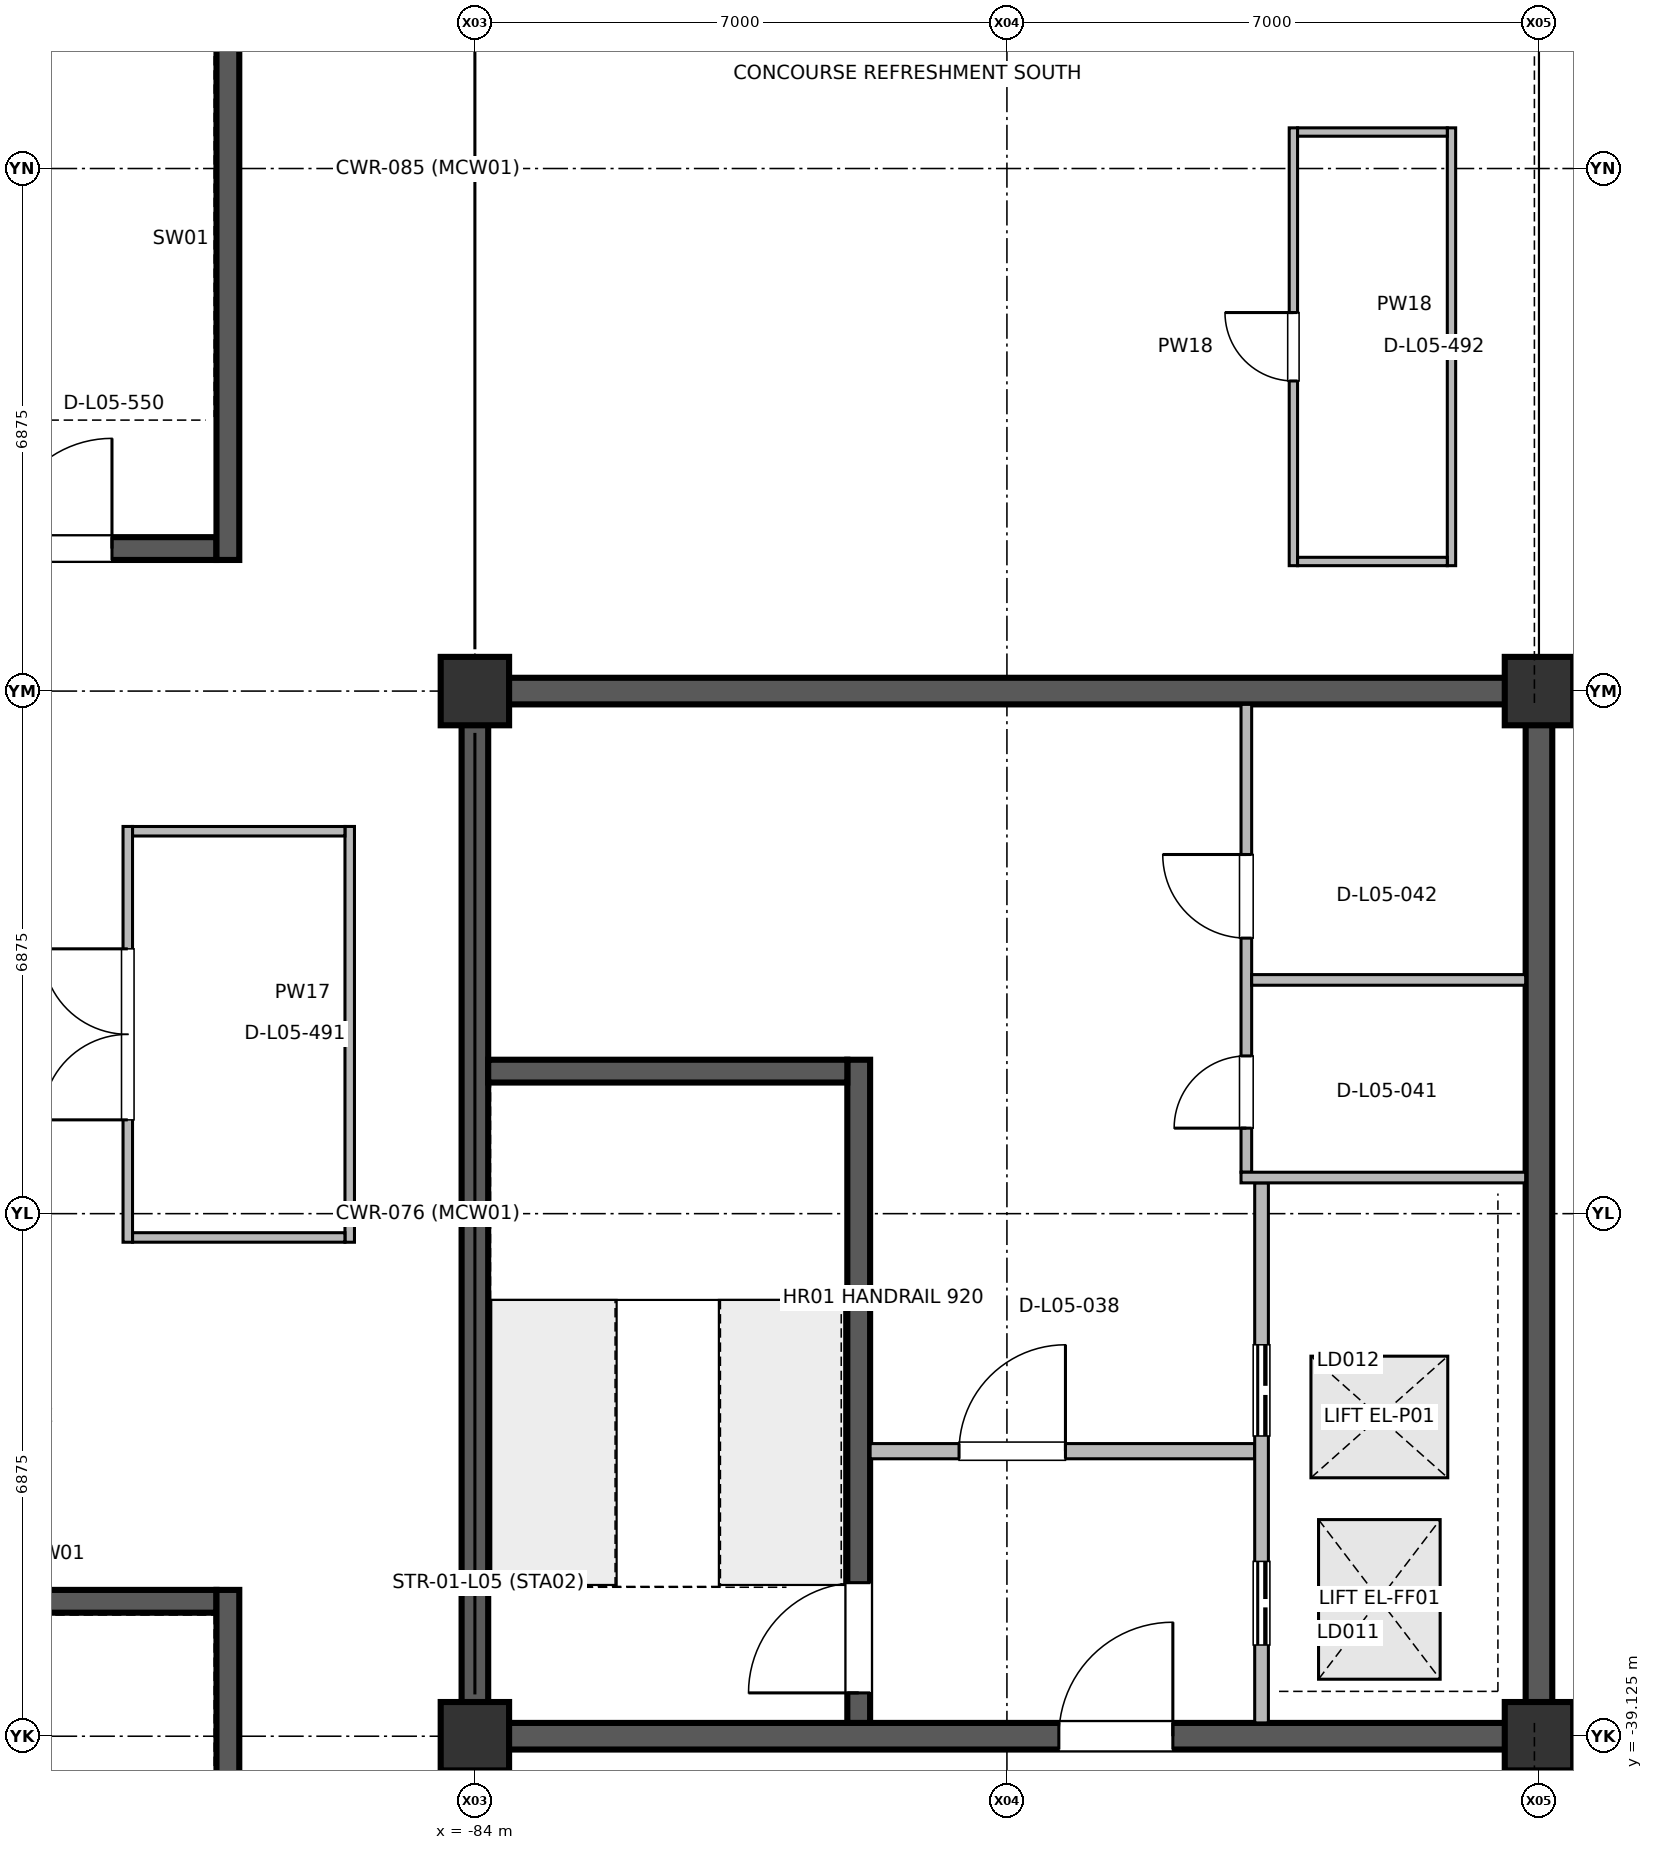
"""IFC4 building model, lengths in metres.
Left out: names, types, materials, properties, quantities, classifications, styles, units other than length and angle.
Written with IfcOpenShell. Run it as: python <this file> out.ifc"""

import sys

from ifc_helpers import new_model, si_unit, direction, frame, frame_2d, origin, origin_2d, place, context, subcontext, project, spatial, rectangle, extrude, element, fill, save


model = new_model("IFC4")
c1 = context("Model", 3, precision=1e-05, world=origin(), true_north=direction((0.0, 1.0)))
c2 = subcontext(c1, "Body", "Model", "MODEL_VIEW")
j1 = project(units=[si_unit("LENGTHUNIT", "METRE"), si_unit("PLANEANGLEUNIT", "RADIAN")], contexts=[c1])
p1 = place(None, origin())
s1 = spatial("IfcSite", under=j1, at=p1, CompositionType="ELEMENT")
p2 = place(p1, origin())
s2 = spatial("IfcBuilding", under=s1, at=p2, CompositionType="ELEMENT")
p3 = place(p2, frame((0.0, 0.0, 21.0)))
s3 = spatial("IfcBuildingStorey", under=s2, at=p3, CompositionType="ELEMENT", Elevation=21.0)
for number, where, z_axis, x_axis in (
    (1, (-84.0, -39.125, 0.0), (0.0, 0.0, 1.0), (1.0, 0.0, 0.0)),
    (2, (-84.0, -25.375, 0.0), (0.0, 0.0, 1.0), (1.0, 0.0, 0.0)),
    (3, (-70.0, -39.125, 0.0), (0.0, 0.0, 1.0), (1.0, 0.0, 0.0)),
    (4, (-70.0, -25.375, 0.0), (0.0, 0.0, 1.0), (1.0, 0.0, 0.0)),
):
    element("IfcColumn", number, at=place(p3, frame(where, z_axis=z_axis, x_axis=x_axis)), inside=s3, PredefinedType="COLUMN", context=c2, shape_type="SweptSolid", body=[
        extrude(rectangle(XDim=0.9, YDim=0.9, at=origin_2d()), origin(), (0.0, 0.0, 1.0), 5.398),
    ])
for number, where, z_axis, x_axis in (
    (5, (-84.0, -38.95, 0.0), (0.0, 0.0, 1.0), (0.0, 1.0, 0.0)),
    (6, (-70.0, -38.95, 0.0), (0.0, 0.0, 1.0), (0.0, 1.0, 0.0)),
):
    element("IfcWall", number, at=place(p3, frame(where, z_axis=z_axis, x_axis=x_axis)), inside=s3, PredefinedType="SHEAR", context=c2, shape_type="SweptSolid", body=[
        extrude(rectangle(XDim=13.4, YDim=0.35, at=frame_2d((6.7, 0.0))), origin(), (0.0, 0.0, 1.0), 5.22),
    ])
p4 = place(p3, frame((-83.825, -39.125, 0.0), z_axis=(0.0, 0.0, 1.0), x_axis=(1.0, 0.0, 0.0)))
e7 = element("IfcWall", 7, at=p4, inside=s3, PredefinedType="SHEAR", context=c2, shape_type="SweptSolid", body=[
    extrude(rectangle(XDim=13.65, YDim=0.35, at=frame_2d((6.825, 0.0))), origin(), (0.0, 0.0, 1.0), 5.22),
])
p5 = place(p4, frame((7.508, 0.0, 0.0)))
e8 = element("IfcOpeningElement", 8, at=p5, cuts=e7, PredefinedType="OPENING", context=c2, shape_type="SweptSolid", body=[
    extrude(rectangle(XDim=1.5, YDim=2.2, at=frame_2d((0.75, 1.1))), frame((0.0, 0.185, 0.0), z_axis=(0.0, -1.0, 0.0), x_axis=(1.0, 0.0, 0.0)), (0.0, 0.0, 1.0), 0.37),
])
p6 = place(p3, frame((-83.825, -25.375, 0.0), z_axis=(0.0, 0.0, 1.0), x_axis=(1.0, 0.0, 0.0)))
e9 = element("IfcWall", 9, at=p6, inside=s3, PredefinedType="SHEAR", context=c2, shape_type="SweptSolid", body=[
    extrude(rectangle(XDim=13.65, YDim=0.35, at=frame_2d((6.825, 0.0))), origin(), (0.0, 0.0, 1.0), 5.22),
])
p7 = place(p3, frame((-78.95, -38.95, 0.0), z_axis=(0.0, 0.0, 1.0), x_axis=(0.0, 1.0, 0.0)))
e10 = element("IfcWall", 10, at=p7, inside=s3, PredefinedType="SHEAR", context=c2, shape_type="SweptSolid", body=[
    extrude(rectangle(XDim=8.725, YDim=0.3, at=frame_2d((4.362, 0.0))), origin(), (0.0, 0.0, 1.0), 5.22),
])
p8 = place(p7, frame((0.395, 0.0, 0.0)))
e11 = element("IfcOpeningElement", 11, at=p8, cuts=e10, PredefinedType="OPENING", context=c2, shape_type="SweptSolid", body=[
    extrude(rectangle(XDim=1.45, YDim=2.2, at=frame_2d((0.725, 1.1))), frame((0.0, 0.16, 0.0), z_axis=(0.0, -1.0, 0.0), x_axis=(1.0, 0.0, 0.0)), (0.0, 0.0, 1.0), 0.32),
])
p9 = place(p3, frame((-78.8, -35.375, 0.0), z_axis=(0.0, 0.0, 1.0), x_axis=(1.0, 0.0, 0.0)))
e12 = element("IfcWall", 12, at=p9, inside=s3, PredefinedType="PARTITIONING", context=c2, shape_type="SweptSolid", body=[
    extrude(rectangle(XDim=5.06, YDim=0.2, at=frame_2d((2.53, 0.0))), origin(), (0.0, 0.0, 1.0), 4.42),
])
p10 = place(p9, frame((1.17, 0.0, 0.0)))
e13 = element("IfcOpeningElement", 13, at=p10, cuts=e12, PredefinedType="OPENING", context=c2, shape_type="SweptSolid", body=[
    extrude(rectangle(XDim=1.4, YDim=2.2, at=frame_2d((0.7, 1.1))), frame((0.0, 0.11, 0.0), z_axis=(0.0, -1.0, 0.0), x_axis=(1.0, 0.0, 0.0)), (0.0, 0.0, 1.0), 0.22),
])
p11 = place(p3, frame((-73.65, -38.95, 0.0), z_axis=(0.0, 0.0, 1.0), x_axis=(0.0, 1.0, 0.0)))
e14 = element("IfcWall", 14, at=p11, inside=s3, PredefinedType="PARTITIONING", context=c2, shape_type="SweptSolid", body=[
    extrude(rectangle(XDim=7.105, YDim=0.18, at=frame_2d((3.552, 0.0))), origin(), (0.0, 0.0, 1.0), 4.42),
])
p12 = place(p11, frame((1.025, 0.0, 0.0)))
e15 = element("IfcOpeningElement", 15, at=p12, cuts=e14, PredefinedType="OPENING", context=c2, shape_type="SweptSolid", body=[
    extrude(rectangle(XDim=1.1, YDim=2.2, at=frame_2d((0.55, 1.1))), frame((0.0, 0.1, 0.0), z_axis=(0.0, -1.0, 0.0), x_axis=(1.0, 0.0, 0.0)), (0.0, 0.0, 1.0), 0.2),
])
p13 = place(p11, frame((3.775, 0.0, 0.0)))
e16 = element("IfcOpeningElement", 16, at=p13, cuts=e14, PredefinedType="OPENING", context=c2, shape_type="SweptSolid", body=[
    extrude(rectangle(XDim=1.2, YDim=2.25, at=frame_2d((0.6, 1.125))), frame((0.0, 0.1, 0.0), z_axis=(0.0, -1.0, 0.0), x_axis=(1.0, 0.0, 0.0)), (0.0, 0.0, 1.0), 0.2),
])
p14 = place(p3, frame((-73.85, -31.705, 0.0), z_axis=(0.0, 0.0, 1.0), x_axis=(0.0, 1.0, 0.0)))
e17 = element("IfcWall", 17, at=p14, inside=s3, PredefinedType="PARTITIONING", context=c2, shape_type="SweptSolid", body=[
    extrude(rectangle(XDim=6.155, YDim=0.14, at=frame_2d((3.078, 0.0))), origin(), (0.0, 0.0, 1.0), 4.42),
])
p15 = place(p14, frame((0.58, 0.0, 0.0)))
e18 = element("IfcOpeningElement", 18, at=p15, cuts=e17, PredefinedType="OPENING", context=c2, shape_type="SweptSolid", body=[
    extrude(rectangle(XDim=0.95, YDim=2.15, at=frame_2d((0.475, 1.075))), frame((0.0, 0.08, 0.0), z_axis=(0.0, -1.0, 0.0), x_axis=(1.0, 0.0, 0.0)), (0.0, 0.0, 1.0), 0.16),
])
p16 = place(p14, frame((3.08, 0.0, 0.0)))
e19 = element("IfcOpeningElement", 19, at=p16, cuts=e17, PredefinedType="OPENING", context=c2, shape_type="SweptSolid", body=[
    extrude(rectangle(XDim=1.1, YDim=2.15, at=frame_2d((0.55, 1.075))), frame((0.0, 0.08, 0.0), z_axis=(0.0, -1.0, 0.0), x_axis=(1.0, 0.0, 0.0)), (0.0, 0.0, 1.0), 0.16),
])
p17 = place(p3, frame((-88.567, -32.626, 0.0), z_axis=(0.0, 0.0, 1.0), x_axis=(0.0, 1.0, 0.0)))
e20 = element("IfcWall", 20, at=p17, inside=s3, PredefinedType="PARTITIONING", context=c2, shape_type="SweptSolid", body=[
    extrude(rectangle(XDim=5.47, YDim=0.125, at=frame_2d((2.735, 0.0))), origin(), (0.0, 0.0, 1.0), 4.42),
])
p18 = place(p17, frame((1.61, 0.0, 0.0)))
e21 = element("IfcOpeningElement", 21, at=p18, cuts=e20, PredefinedType="OPENING", context=c2, shape_type="SweptSolid", body=[
    extrude(rectangle(XDim=2.25, YDim=2.45, at=frame_2d((1.125, 1.225))), frame((0.0, 0.073, 0.0), z_axis=(0.0, -1.0, 0.0), x_axis=(1.0, 0.0, 0.0)), (0.0, 0.0, 1.0), 0.145),
])
p19 = place(p3, frame((-73.231, -23.725, 0.0), z_axis=(0.0, 0.0, 1.0), x_axis=(0.0, 1.0, 0.0)))
e22 = element("IfcWall", 22, at=p19, inside=s3, PredefinedType="PARTITIONING", context=c2, shape_type="SweptSolid", body=[
    extrude(rectangle(XDim=5.76, YDim=0.11, at=frame_2d((2.88, 0.0))), origin(), (0.0, 0.0, 1.0), 4.42),
])
p20 = place(p19, frame((2.43, 0.0, 0.0)))
e23 = element("IfcOpeningElement", 23, at=p20, cuts=e22, PredefinedType="OPENING", context=c2, shape_type="SweptSolid", body=[
    extrude(rectangle(XDim=0.9, YDim=2.15, at=frame_2d((0.45, 1.075))), frame((0.0, 0.065, 0.0), z_axis=(0.0, -1.0, 0.0), x_axis=(1.0, 0.0, 0.0)), (0.0, 0.0, 1.0), 0.13),
])
p21 = place(p3, frame((-73.92, -31.775, 0.0), z_axis=(0.0, 0.0, 1.0), x_axis=(1.0, 0.0, 0.0)))
e24 = element("IfcWall", 24, at=p21, inside=s3, PredefinedType="PARTITIONING", context=c2, shape_type="SweptSolid", body=[
    extrude(rectangle(XDim=3.745, YDim=0.14, at=frame_2d((1.873, 0.0))), origin(), (0.0, 0.0, 1.0), 4.42),
])
p22 = place(p3, frame((-73.78, -29.175, 0.0), z_axis=(0.0, 0.0, 1.0), x_axis=(1.0, 0.0, 0.0)))
e25 = element("IfcWall", 25, at=p22, inside=s3, PredefinedType="PARTITIONING", context=c2, shape_type="SweptSolid", body=[
    extrude(rectangle(XDim=3.605, YDim=0.14, at=frame_2d((1.802, 0.0))), origin(), (0.0, 0.0, 1.0), 4.42),
])
p23 = place(p3, frame((-85.647, -32.626, 0.0), z_axis=(0.0, 0.0, 1.0), x_axis=(0.0, 1.0, 0.0)))
e26 = element("IfcWall", 26, at=p23, inside=s3, PredefinedType="PARTITIONING", context=c2, shape_type="SweptSolid", body=[
    extrude(rectangle(XDim=5.47, YDim=0.125, at=frame_2d((2.735, 0.0))), origin(), (0.0, 0.0, 1.0), 4.42),
])
for number, where, z_axis, x_axis in (
    (27, (-88.504, -32.563, 0.0), (0.0, 0.0, 1.0), (1.0, 0.0, 0.0)),
    (28, (-88.504, -27.219, 0.0), (0.0, 0.0, 1.0), (1.0, 0.0, 0.0)),
):
    element("IfcWall", number, at=place(p3, frame(where, z_axis=z_axis, x_axis=x_axis)), inside=s3, PredefinedType="PARTITIONING", context=c2, shape_type="SweptSolid", body=[
        extrude(rectangle(XDim=2.794, YDim=0.125, at=frame_2d((1.397, 0.0))), origin(), (0.0, 0.0, 1.0), 4.42),
    ])
p24 = place(p3, frame((-71.151, -23.725, 0.0), z_axis=(0.0, 0.0, 1.0), x_axis=(0.0, 1.0, 0.0)))
e29 = element("IfcWall", 29, at=p24, inside=s3, PredefinedType="PARTITIONING", context=c2, shape_type="SweptSolid", body=[
    extrude(rectangle(XDim=5.76, YDim=0.11, at=frame_2d((2.88, 0.0))), origin(), (0.0, 0.0, 1.0), 4.42),
])
for number, where, z_axis, x_axis in (
    (30, (-73.176, -23.67, 0.0), (0.0, 0.0, 1.0), (1.0, 0.0, 0.0)),
    (31, (-73.176, -18.02, 0.0), (0.0, 0.0, 1.0), (1.0, 0.0, 0.0)),
):
    element("IfcWall", number, at=place(p3, frame(where, z_axis=z_axis, x_axis=x_axis)), inside=s3, PredefinedType="PARTITIONING", context=c2, shape_type="SweptSolid", body=[
        extrude(rectangle(XDim=1.97, YDim=0.11, at=frame_2d((0.985, 0.0))), origin(), (0.0, 0.0, 1.0), 4.42),
    ])
p25 = place(p3, frame((-83.825, -30.375, 0.0), z_axis=(0.0, 0.0, 1.0), x_axis=(1.0, 0.0, 0.0)))
e32 = element("IfcWall", 32, at=p25, inside=s3, PredefinedType="SHEAR", context=c2, shape_type="SweptSolid", body=[
    extrude(rectangle(XDim=4.725, YDim=0.3, at=frame_2d((2.362, 0.0))), origin(), (0.0, 0.0, 1.0), 5.22),
])
p26 = place(p3, frame((-91.6, -37.35, 0.0), z_axis=(0.0, 0.0, 1.0), x_axis=(1.0, 0.0, 0.0)))
e33 = element("IfcWall", 33, at=p26, inside=s3, PredefinedType="SHEAR", context=c2, shape_type="SweptSolid", body=[
    extrude(rectangle(XDim=4.2, YDim=0.3, at=frame_2d((2.1, 0.0))), origin(), (0.0, 0.0, 1.0), 5.22),
])
p27 = place(p3, frame((-87.25, -45.65, 0.0), z_axis=(0.0, 0.0, 1.0), x_axis=(0.0, 1.0, 0.0)))
e34 = element("IfcWall", 34, at=p27, inside=s3, PredefinedType="SHEAR", context=c2, shape_type="SweptSolid", body=[
    extrude(rectangle(XDim=8.45, YDim=0.3, at=frame_2d((4.225, 0.0))), origin(), (0.0, 0.0, 1.0), 5.22),
])
p28 = place(p3, frame((-91.6, -23.5, 0.0), z_axis=(0.0, 0.0, 1.0), x_axis=(1.0, 0.0, 0.0)))
e35 = element("IfcWall", 35, at=p28, inside=s3, PredefinedType="SHEAR", context=c2, shape_type="SweptSolid", body=[
    extrude(rectangle(XDim=4.2, YDim=0.3, at=frame_2d((2.1, 0.0))), origin(), (0.0, 0.0, 1.0), 5.22),
])
p29 = place(p28, frame((1.375, 0.0, 0.0)))
e36 = element("IfcOpeningElement", 36, at=p29, cuts=e35, PredefinedType="OPENING", context=c2, shape_type="SweptSolid", body=[
    extrude(rectangle(XDim=1.45, YDim=2.2, at=frame_2d((0.725, 1.1))), frame((0.0, 0.16, 0.0), z_axis=(0.0, -1.0, 0.0), x_axis=(1.0, 0.0, 0.0)), (0.0, 0.0, 1.0), 0.32),
])
p30 = place(p3, frame((-87.25, -23.65, 0.0), z_axis=(0.0, 0.0, 1.0), x_axis=(0.0, 1.0, 0.0)))
e37 = element("IfcWall", 37, at=p30, inside=s3, PredefinedType="SHEAR", context=c2, shape_type="SweptSolid", body=[
    extrude(rectangle(XDim=8.45, YDim=0.3, at=frame_2d((4.225, 0.0))), origin(), (0.0, 0.0, 1.0), 5.22),
])
p31 = place(p5, origin())
e38 = element("IfcDoor", 38, at=p31, inside=s3, OperationType="SINGLE_SWING_RIGHT", PredefinedType="DOOR", context=c2, shape_type="SweptSolid", body=[
    extrude(rectangle(XDim=1.5, YDim=2.2, at=frame_2d((0.75, 1.1))), frame((0.0, 0.025, 0.0), z_axis=(0.0, -1.0, 0.0), x_axis=(1.0, 0.0, 0.0)), (0.0, 0.0, 1.0), 0.05),
])
fill(e8, e38)
p32 = place(p8, origin())
e39 = element("IfcDoor", 39, at=p32, inside=s3, OperationType="SINGLE_SWING_LEFT", PredefinedType="DOOR", context=c2, shape_type="SweptSolid", body=[
    extrude(rectangle(XDim=1.45, YDim=2.2, at=frame_2d((0.725, 1.1))), frame((0.0, 0.025, 0.0), z_axis=(0.0, -1.0, 0.0), x_axis=(1.0, 0.0, 0.0)), (0.0, 0.0, 1.0), 0.05),
])
fill(e11, e39)
p33 = place(p10, origin())
e40 = element("IfcDoor", 40, at=p33, inside=s3, OperationType="SINGLE_SWING_RIGHT", PredefinedType="DOOR", context=c2, shape_type="SweptSolid", body=[
    extrude(rectangle(XDim=1.4, YDim=2.2, at=frame_2d((0.7, 1.1))), frame((0.0, 0.025, 0.0), z_axis=(0.0, -1.0, 0.0), x_axis=(1.0, 0.0, 0.0)), (0.0, 0.0, 1.0), 0.05),
])
fill(e13, e40)
p34 = place(p12, origin())
e41 = element("IfcDoor", 41, at=p34, inside=s3, OperationType="DOUBLE_DOOR_SLIDING", PredefinedType="DOOR", context=c2, shape_type="SweptSolid", body=[
    extrude(rectangle(XDim=1.1, YDim=2.2, at=frame_2d((0.55, 1.1))), frame((0.0, 0.025, 0.0), z_axis=(0.0, -1.0, 0.0), x_axis=(1.0, 0.0, 0.0)), (0.0, 0.0, 1.0), 0.05),
])
fill(e15, e41)
p35 = place(p13, origin())
e42 = element("IfcDoor", 42, at=p35, inside=s3, OperationType="DOUBLE_DOOR_SLIDING", PredefinedType="DOOR", context=c2, shape_type="SweptSolid", body=[
    extrude(rectangle(XDim=1.2, YDim=2.25, at=frame_2d((0.6, 1.125))), frame((0.0, 0.025, 0.0), z_axis=(0.0, -1.0, 0.0), x_axis=(1.0, 0.0, 0.0)), (0.0, 0.0, 1.0), 0.05),
])
fill(e16, e42)
p36 = place(p15, origin())
e43 = element("IfcDoor", 43, at=p36, inside=s3, OperationType="SINGLE_SWING_LEFT", PredefinedType="DOOR", context=c2, shape_type="SweptSolid", body=[
    extrude(rectangle(XDim=0.95, YDim=2.15, at=frame_2d((0.475, 1.075))), frame((0.0, 0.025, 0.0), z_axis=(0.0, -1.0, 0.0), x_axis=(1.0, 0.0, 0.0)), (0.0, 0.0, 1.0), 0.05),
])
fill(e18, e43)
p37 = place(p16, origin())
e44 = element("IfcDoor", 44, at=p37, inside=s3, OperationType="SINGLE_SWING_RIGHT", PredefinedType="DOOR", context=c2, shape_type="SweptSolid", body=[
    extrude(rectangle(XDim=1.1, YDim=2.15, at=frame_2d((0.55, 1.075))), frame((0.0, 0.025, 0.0), z_axis=(0.0, -1.0, 0.0), x_axis=(1.0, 0.0, 0.0)), (0.0, 0.0, 1.0), 0.05),
])
fill(e19, e44)
p38 = place(p18, origin())
e45 = element("IfcDoor", 45, at=p38, inside=s3, OperationType="DOUBLE_DOOR_SINGLE_SWING", PredefinedType="DOOR", context=c2, shape_type="SweptSolid", body=[
    extrude(rectangle(XDim=2.25, YDim=2.45, at=frame_2d((1.125, 1.225))), frame((0.0, 0.025, 0.0), z_axis=(0.0, -1.0, 0.0), x_axis=(1.0, 0.0, 0.0)), (0.0, 0.0, 1.0), 0.05),
])
fill(e21, e45)
p39 = place(p20, origin())
e46 = element("IfcDoor", 46, at=p39, inside=s3, OperationType="SINGLE_SWING_RIGHT", PredefinedType="DOOR", context=c2, shape_type="SweptSolid", body=[
    extrude(rectangle(XDim=0.9, YDim=2.15, at=frame_2d((0.45, 1.075))), frame((0.0, 0.025, 0.0), z_axis=(0.0, -1.0, 0.0), x_axis=(1.0, 0.0, 0.0)), (0.0, 0.0, 1.0), 0.05),
])
fill(e23, e46)
p40 = place(p29, origin())
e47 = element("IfcDoor", 47, at=p40, inside=s3, OperationType="SINGLE_SWING_RIGHT", PredefinedType="DOOR", context=c2, shape_type="SweptSolid", body=[
    extrude(rectangle(XDim=1.45, YDim=2.2, at=frame_2d((0.725, 1.1))), frame((0.0, 0.025, 0.0), z_axis=(0.0, -1.0, 0.0), x_axis=(1.0, 0.0, 0.0)), (0.0, 0.0, 1.0), 0.05),
])
fill(e36, e47)
save(model, sys.argv[1])
